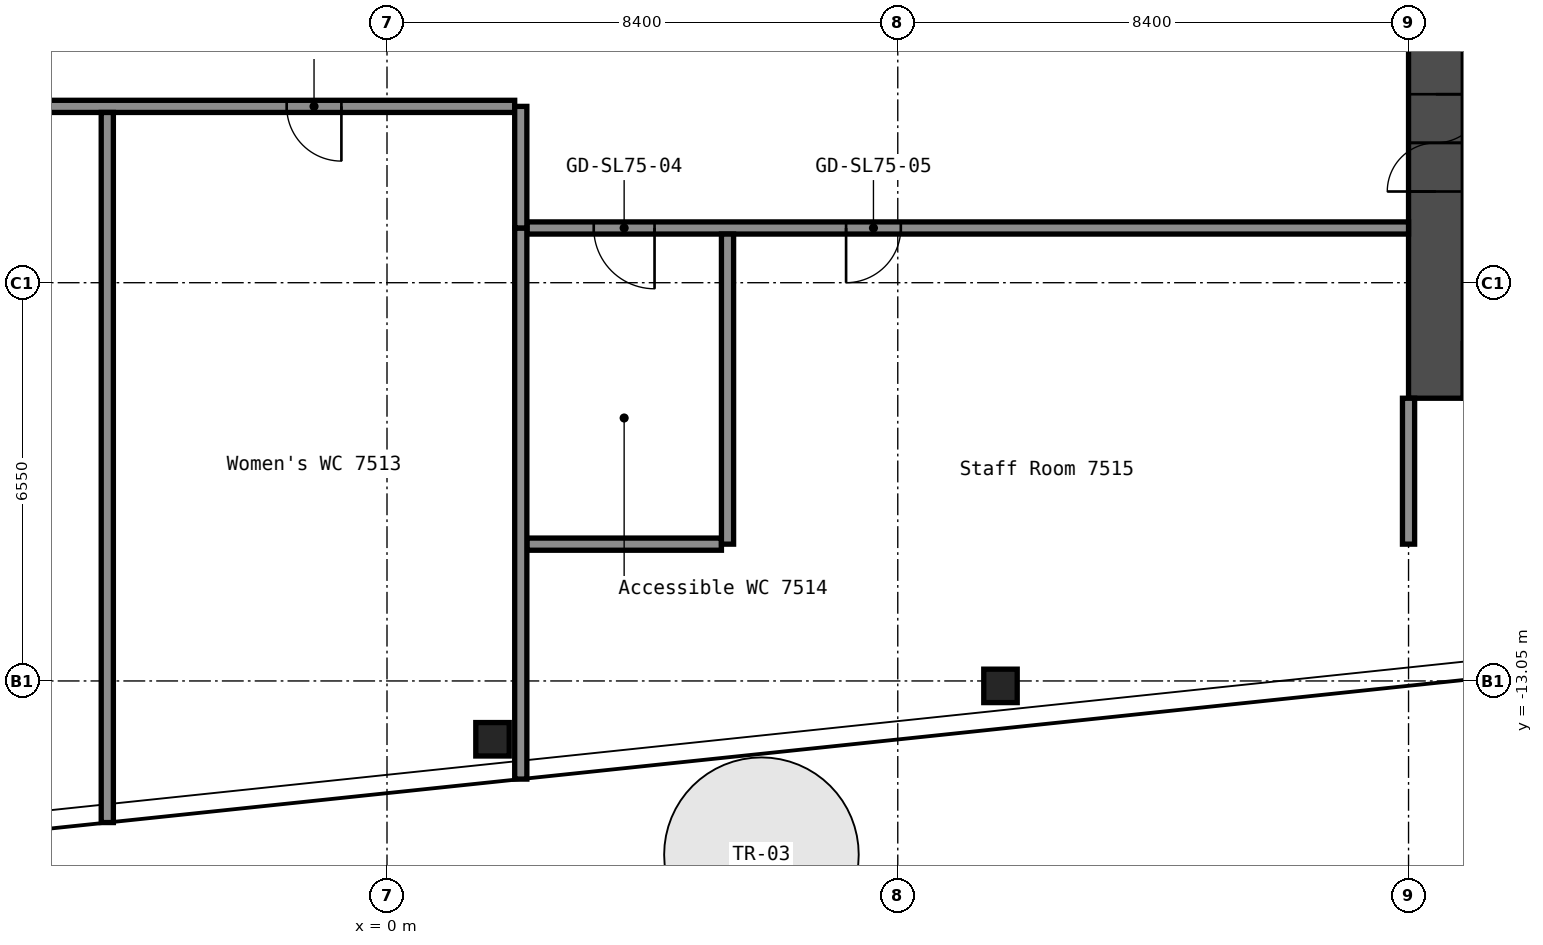
"""IFC4 building model, lengths in metres.
Left out: names, types, materials, properties, quantities, classifications, styles, units other than length and angle.
Written with IfcOpenShell. Run it as: python <this file> out.ifc"""

import sys

from ifc_helpers import new_model, si_unit, direction, frame, frame_2d, origin, origin_2d, place, context, subcontext, project, spatial, rectangle, hollow_rectangle, extrude, element, fill, save


model = new_model("IFC4")
c1 = context("Model", 3, precision=1e-05, world=origin(), true_north=direction((0.0, 1.0)))
c2 = subcontext(c1, "Body", "Model", "MODEL_VIEW")
j1 = project(units=[si_unit("LENGTHUNIT", "METRE"), si_unit("PLANEANGLEUNIT", "RADIAN")], contexts=[c1])
p1 = place(None, origin())
s1 = spatial("IfcSite", under=j1, at=p1, CompositionType="ELEMENT")
p2 = place(p1, origin())
s2 = spatial("IfcBuilding", under=s1, at=p2, CompositionType="ELEMENT")
p3 = place(p2, frame((0.0, 0.0, 264.6)))
s3 = spatial("IfcBuildingStorey", under=s2, at=p3, CompositionType="ELEMENT", Elevation=264.6)
for number, where, z_axis, x_axis in (
    (1, (1.735, -14.009, 0.0), (0.0, 0.0, 1.0), (1.0, 0.0, 0.0)),
    (2, (10.089, -13.131, 0.0), (0.0, 0.0, 1.0), (1.0, 0.0, 0.0)),
):
    element("IfcColumn", number, at=place(p3, frame(where, z_axis=z_axis, x_axis=x_axis)), inside=s3, PredefinedType="COLUMN", context=c2, shape_type="SweptSolid", body=[
        extrude(hollow_rectangle(XDim=0.55, YDim=0.55, WallThickness=0.022, InnerFilletRadius=0.033, OuterFilletRadius=0.055, at=origin_2d()), origin(), (0.0, 0.0, 1.0), 5.55),
    ])
p4 = place(p3, frame((17.25, -8.4, 0.0), z_axis=(0.0, 0.0, 1.0), x_axis=(0.0, 1.0, 0.0)))
e3 = element("IfcWall", 3, at=p4, inside=s3, PredefinedType="SHEAR", context=c2, shape_type="SweptSolid", body=[
    extrude(rectangle(XDim=16.8, YDim=0.9, at=frame_2d((8.4, 0.0))), origin(), (0.0, 0.0, 1.0), 5.55),
])
p5 = place(p4, frame((3.4, 0.0, 0.0)))
e4 = element("IfcOpeningElement", 4, at=p5, cuts=e3, PredefinedType="OPENING", context=c2, shape_type="SweptSolid", body=[
    extrude(rectangle(XDim=1.6, YDim=2.1, at=frame_2d((0.8, 1.05))), frame((0.0, 0.46, 0.0), z_axis=(0.0, -1.0, 0.0), x_axis=(1.0, 0.0, 0.0)), (0.0, 0.0, 1.0), 0.92),
])
p6 = place(p4, frame((9.6, 0.0, 0.0)))
e5 = element("IfcOpeningElement", 5, at=p6, cuts=e3, PredefinedType="OPENING", context=c2, shape_type="SweptSolid", body=[
    extrude(rectangle(XDim=1.6, YDim=2.1, at=frame_2d((0.8, 1.05))), frame((0.0, 0.46, 0.0), z_axis=(0.0, -1.0, 0.0), x_axis=(1.0, 0.0, 0.0)), (0.0, 0.0, 1.0), 0.92),
])
p7 = place(p4, frame((11.8, 0.0, 0.0)))
e6 = element("IfcOpeningElement", 6, at=p7, cuts=e3, PredefinedType="OPENING", context=c2, shape_type="SweptSolid", body=[
    extrude(rectangle(XDim=1.6, YDim=2.1, at=frame_2d((0.8, 1.05))), frame((0.0, 0.46, 0.0), z_axis=(0.0, -1.0, 0.0), x_axis=(1.0, 0.0, 0.0)), (0.0, 0.0, 1.0), 0.92),
])
p8 = place(p3, frame((2.3, -10.8, 0.0), z_axis=(0.0, 0.0, 1.0), x_axis=(1.0, 0.0, 0.0)))
e7 = element("IfcWall", 7, at=p8, inside=s3, PredefinedType="PARTITIONING", context=c2, shape_type="SweptSolid", body=[
    extrude(rectangle(XDim=3.2, YDim=0.2, at=frame_2d((1.6, 0.0))), origin(), (0.0, 0.0, 1.0), 5.55),
])
p9 = place(p3, frame((2.3, -5.6, 0.0), z_axis=(0.0, 0.0, 1.0), x_axis=(1.0, 0.0, 0.0)))
e8 = element("IfcWall", 8, at=p9, inside=s3, PredefinedType="PARTITIONING", context=c2, shape_type="SweptSolid", body=[
    extrude(rectangle(XDim=14.5, YDim=0.2, at=frame_2d((7.25, 0.0))), origin(), (0.0, 0.0, 1.0), 5.55),
])
p10 = place(p9, frame((1.1, 0.0, 0.0)))
e9 = element("IfcOpeningElement", 9, at=p10, cuts=e8, PredefinedType="OPENING", context=c2, shape_type="SweptSolid", body=[
    extrude(rectangle(XDim=1.0, YDim=2.1, at=frame_2d((0.5, 1.05))), frame((0.0, 0.11, 0.0), z_axis=(0.0, -1.0, 0.0), x_axis=(1.0, 0.0, 0.0)), (0.0, 0.0, 1.0), 0.22),
])
p11 = place(p9, frame((5.25, 0.0, 0.0)))
e10 = element("IfcOpeningElement", 10, at=p11, cuts=e8, PredefinedType="OPENING", context=c2, shape_type="SweptSolid", body=[
    extrude(rectangle(XDim=0.9, YDim=2.1, at=frame_2d((0.45, 1.05))), frame((0.0, 0.11, 0.0), z_axis=(0.0, -1.0, 0.0), x_axis=(1.0, 0.0, 0.0)), (0.0, 0.0, 1.0), 0.22),
])
p12 = place(p3, frame((-13.1, -3.6, 0.0), z_axis=(0.0, 0.0, 1.0), x_axis=(1.0, 0.0, 0.0)))
e11 = element("IfcWall", 11, at=p12, inside=s3, PredefinedType="PARTITIONING", context=c2, shape_type="SweptSolid", body=[
    extrude(rectangle(XDim=15.2, YDim=0.2, at=frame_2d((7.6, 0.0))), origin(), (0.0, 0.0, 1.0), 5.55),
])
p13 = place(p12, frame((0.45, 0.0, 0.0)))
e12 = element("IfcOpeningElement", 12, at=p13, cuts=e11, PredefinedType="OPENING", context=c2, shape_type="SweptSolid", body=[
    extrude(rectangle(XDim=0.9, YDim=2.1, at=frame_2d((0.45, 1.05))), frame((0.0, 0.11, 0.0), z_axis=(0.0, -1.0, 0.0), x_axis=(1.0, 0.0, 0.0)), (0.0, 0.0, 1.0), 0.22),
])
p14 = place(p12, frame((4.85, 0.0, 0.0)))
e13 = element("IfcOpeningElement", 13, at=p14, cuts=e11, PredefinedType="OPENING", context=c2, shape_type="SweptSolid", body=[
    extrude(rectangle(XDim=0.9, YDim=2.1, at=frame_2d((0.45, 1.05))), frame((0.0, 0.11, 0.0), z_axis=(0.0, -1.0, 0.0), x_axis=(1.0, 0.0, 0.0)), (0.0, 0.0, 1.0), 0.22),
])
p15 = place(p12, frame((11.45, 0.0, 0.0)))
e14 = element("IfcOpeningElement", 14, at=p15, cuts=e11, PredefinedType="OPENING", context=c2, shape_type="SweptSolid", body=[
    extrude(rectangle(XDim=0.9, YDim=2.1, at=frame_2d((0.45, 1.05))), frame((0.0, 0.11, 0.0), z_axis=(0.0, -1.0, 0.0), x_axis=(1.0, 0.0, 0.0)), (0.0, 0.0, 1.0), 0.22),
])
p16 = place(p3, frame((-4.6, -15.379, 0.0), z_axis=(0.0, 0.0, 1.0), x_axis=(0.0, 1.0, 0.0)))
e15 = element("IfcWall", 15, at=p16, inside=s3, PredefinedType="PARTITIONING", context=c2, shape_type="SweptSolid", body=[
    extrude(rectangle(XDim=11.679, YDim=0.2, at=frame_2d((5.839, 0.0))), origin(), (0.0, 0.0, 1.0), 5.55),
])
p17 = place(p3, frame((2.2, -14.664, 0.0), z_axis=(0.0, 0.0, 1.0), x_axis=(0.0, 1.0, 0.0)))
e16 = element("IfcWall", 16, at=p17, inside=s3, PredefinedType="PARTITIONING", context=c2, shape_type="SweptSolid", body=[
    extrude(rectangle(XDim=9.064, YDim=0.2, at=frame_2d((4.532, 0.0))), origin(), (0.0, 0.0, 1.0), 5.55),
])
p18 = place(p3, frame((2.2, -5.6, 0.0), z_axis=(0.0, 0.0, 1.0), x_axis=(0.0, 1.0, 0.0)))
e17 = element("IfcWall", 17, at=p18, inside=s3, PredefinedType="PARTITIONING", context=c2, shape_type="SweptSolid", body=[
    extrude(rectangle(XDim=2.0, YDim=0.2, at=frame_2d((1.0, 0.0))), origin(), (0.0, 0.0, 1.0), 5.55),
])
p19 = place(p3, frame((5.6, -10.8, 0.0), z_axis=(0.0, 0.0, 1.0), x_axis=(0.0, 1.0, 0.0)))
e18 = element("IfcWall", 18, at=p19, inside=s3, PredefinedType="PARTITIONING", context=c2, shape_type="SweptSolid", body=[
    extrude(rectangle(XDim=5.1, YDim=0.2, at=frame_2d((2.55, 0.0))), origin(), (0.0, 0.0, 1.0), 5.55),
])
p20 = place(p3, frame((16.8, -10.8, 0.0), z_axis=(0.0, 0.0, 1.0), x_axis=(0.0, 1.0, 0.0)))
e19 = element("IfcWall", 19, at=p20, inside=s3, PredefinedType="PARTITIONING", context=c2, shape_type="SweptSolid", body=[
    extrude(rectangle(XDim=2.4, YDim=0.2, at=frame_2d((1.2, 0.0))), origin(), (0.0, 0.0, 1.0), 5.55),
])
p21 = place(p5, origin())
e20 = element("IfcDoor", 20, at=p21, inside=s3, OperationType="DOUBLE_DOOR_SINGLE_SWING", PredefinedType="DOOR", context=c2, shape_type="SweptSolid", body=[
    extrude(rectangle(XDim=1.6, YDim=2.1, at=frame_2d((0.8, 1.05))), frame((0.0, 0.025, 0.0), z_axis=(0.0, -1.0, 0.0), x_axis=(1.0, 0.0, 0.0)), (0.0, 0.0, 1.0), 0.05),
])
fill(e4, e20)
p22 = place(p10, origin())
e21 = element("IfcDoor", 21, at=p22, inside=s3, OperationType="SINGLE_SWING_RIGHT", PredefinedType="DOOR", context=c2, shape_type="SweptSolid", body=[
    extrude(rectangle(XDim=1.0, YDim=2.1, at=frame_2d((0.5, 1.05))), frame((0.0, 0.025, 0.0), z_axis=(0.0, -1.0, 0.0), x_axis=(1.0, 0.0, 0.0)), (0.0, 0.0, 1.0), 0.05),
])
fill(e9, e21)
p23 = place(p11, origin())
e22 = element("IfcDoor", 22, at=p23, inside=s3, OperationType="SINGLE_SWING_LEFT", PredefinedType="DOOR", context=c2, shape_type="SweptSolid", body=[
    extrude(rectangle(XDim=0.9, YDim=2.1, at=frame_2d((0.45, 1.05))), frame((0.0, 0.025, 0.0), z_axis=(0.0, -1.0, 0.0), x_axis=(1.0, 0.0, 0.0)), (0.0, 0.0, 1.0), 0.05),
])
fill(e10, e22)
p24 = place(p15, origin())
e23 = element("IfcDoor", 23, at=p24, inside=s3, OperationType="SINGLE_SWING_RIGHT", PredefinedType="DOOR", context=c2, shape_type="SweptSolid", body=[
    extrude(rectangle(XDim=0.9, YDim=2.1, at=frame_2d((0.45, 1.05))), frame((0.0, 0.025, 0.0), z_axis=(0.0, -1.0, 0.0), x_axis=(1.0, 0.0, 0.0)), (0.0, 0.0, 1.0), 0.05),
])
fill(e14, e23)
save(model, sys.argv[1])
